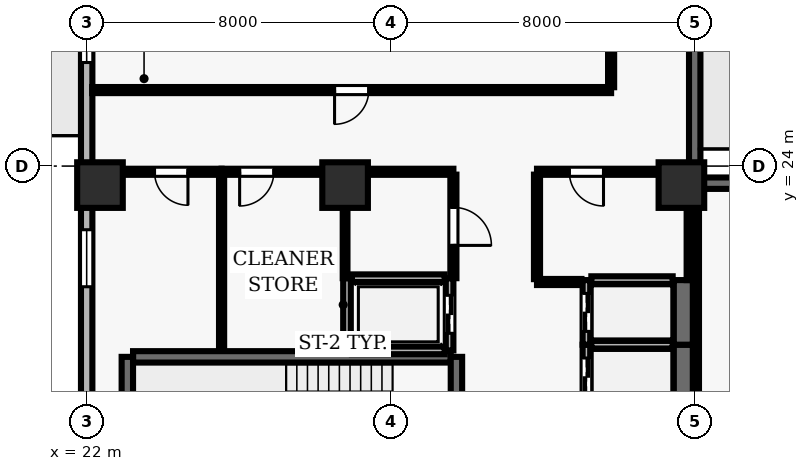
"""IFC4 building model, lengths in metres.
Left out: names, types, materials, properties, quantities, classifications, styles, units other than length and angle.
Written with IfcOpenShell. Run it as: python <this file> out.ifc"""

import sys

from ifc_helpers import new_model, si_unit, direction, frame, frame_2d, origin, origin_2d, place, context, subcontext, project, spatial, rectangle, extrude, element, fill, save


model = new_model("IFC4")
c1 = context("Model", 3, precision=1e-05, world=origin(), true_north=direction((0.0, 1.0)))
c2 = subcontext(c1, "Body", "Model", "MODEL_VIEW")
j1 = project(units=[si_unit("LENGTHUNIT", "METRE"), si_unit("PLANEANGLEUNIT", "RADIAN")], contexts=[c1])
p1 = place(None, origin())
s1 = spatial("IfcSite", under=j1, at=p1, CompositionType="ELEMENT")
p2 = place(p1, origin())
s2 = spatial("IfcBuilding", under=s1, at=p2, CompositionType="ELEMENT")
p3 = place(p2, frame((0.0, 0.0, 154.1)))
s3 = spatial("IfcBuildingStorey", under=s2, at=p3, CompositionType="ELEMENT", Elevation=154.1)
for number, where, z_axis, x_axis in (
    (1, (22.35, 23.5, 0.0), (0.0, 0.0, 1.0), (1.0, 0.0, 0.0)),
    (2, (28.8, 23.5, 0.0), (0.0, 0.0, 1.0), (1.0, 0.0, 0.0)),
    (3, (37.65, 23.5, 0.0), (0.0, 0.0, 1.0), (1.0, 0.0, 0.0)),
):
    element("IfcColumn", number, at=place(p3, frame(where, z_axis=z_axis, x_axis=x_axis)), inside=s3, PredefinedType="COLUMN", context=c2, shape_type="SweptSolid", body=[
        extrude(rectangle(XDim=1.2, YDim=1.2, at=origin_2d()), origin(), (0.0, 0.0, 1.0), 3.9),
    ])
p4 = place(p3, frame((44.194, 23.55, 0.0), z_axis=(0.0, 0.0, 1.0), x_axis=(-1.0, 0.0, 0.0)))
e4 = element("IfcWall", 4, at=p4, inside=s3, PredefinedType="SOLIDWALL", context=c2, shape_type="SweptSolid", body=[
    extrude(rectangle(XDim=6.194, YDim=0.3, at=frame_2d((3.097, 0.0))), origin(), (0.0, 0.0, 1.0), 3.69),
])
p5 = place(p4, frame((1.697, 0.0, 0.9)))
e5 = element("IfcOpeningElement", 5, at=p5, cuts=e4, PredefinedType="OPENING", context=c2, shape_type="SweptSolid", body=[
    extrude(rectangle(XDim=2.8, YDim=1.8, at=frame_2d((1.4, 0.9))), frame((0.0, 0.16, 0.0), z_axis=(0.0, -1.0, 0.0), x_axis=(1.0, 0.0, 0.0)), (0.0, 0.0, 1.0), 0.32),
])
p6 = place(p3, frame((38.0, 23.55, 0.0), z_axis=(0.0, 0.0, 1.0), x_axis=(0.0, 1.0, 0.0)))
e6 = element("IfcWall", 6, at=p6, inside=s3, PredefinedType="SOLIDWALL", context=c2, shape_type="SweptSolid", body=[
    extrude(rectangle(XDim=22.55, YDim=0.3, at=frame_2d((11.275, 0.0))), origin(), (0.0, 0.0, 1.0), 3.69),
])
p7 = place(p6, frame((8.675, 0.0, 0.0)))
e7 = element("IfcOpeningElement", 7, at=p7, cuts=e6, PredefinedType="OPENING", context=c2, shape_type="SweptSolid", body=[
    extrude(rectangle(XDim=1.0, YDim=2.2, at=frame_2d((0.5, 1.1))), frame((0.0, 0.16, 0.0), z_axis=(0.0, -1.0, 0.0), x_axis=(1.0, 0.0, 0.0)), (0.0, 0.0, 1.0), 0.32),
])
p8 = place(p6, frame((13.194, 0.0, 0.9)))
e8 = element("IfcOpeningElement", 8, at=p8, cuts=e6, PredefinedType="OPENING", context=c2, shape_type="SweptSolid", body=[
    extrude(rectangle(XDim=1.8, YDim=2.2, at=frame_2d((0.9, 1.1))), frame((0.0, 0.16, 0.0), z_axis=(0.0, -1.0, 0.0), x_axis=(1.0, 0.0, 0.0)), (0.0, 0.0, 1.0), 0.32),
])
p9 = place(p6, frame((18.831, 0.0, 0.9)))
e9 = element("IfcOpeningElement", 9, at=p9, cuts=e6, PredefinedType="OPENING", context=c2, shape_type="SweptSolid", body=[
    extrude(rectangle(XDim=1.8, YDim=2.2, at=frame_2d((0.9, 1.1))), frame((0.0, 0.16, 0.0), z_axis=(0.0, -1.0, 0.0), x_axis=(1.0, 0.0, 0.0)), (0.0, 0.0, 1.0), 0.32),
])
p10 = place(p3, frame((22.0, 46.1, 0.0), z_axis=(0.0, 0.0, 1.0), x_axis=(0.0, -1.0, 0.0)))
e10 = element("IfcWall", 10, at=p10, inside=s3, PredefinedType="SOLIDWALL", context=c2, shape_type="SweptSolid", body=[
    extrude(rectangle(XDim=43.6, YDim=0.3, at=frame_2d((21.8, 0.0))), origin(), (0.0, 0.0, 1.0), 3.69),
])
p11 = place(p10, frame((6.5, 0.0, 0.0)))
e11 = element("IfcOpeningElement", 11, at=p11, cuts=e10, PredefinedType="OPENING", context=c2, shape_type="SweptSolid", body=[
    extrude(rectangle(XDim=1.0, YDim=2.2, at=frame_2d((0.5, 1.1))), frame((0.0, 0.16, 0.0), z_axis=(0.0, -1.0, 0.0), x_axis=(1.0, 0.0, 0.0)), (0.0, 0.0, 1.0), 0.32),
])
p12 = place(p10, frame((11.975, 0.0, 0.9)))
e12 = element("IfcOpeningElement", 12, at=p12, cuts=e10, PredefinedType="OPENING", context=c2, shape_type="SweptSolid", body=[
    extrude(rectangle(XDim=1.5, YDim=1.6, at=frame_2d((0.75, 0.8))), frame((0.0, 0.16, 0.0), z_axis=(0.0, -1.0, 0.0), x_axis=(1.0, 0.0, 0.0)), (0.0, 0.0, 1.0), 0.32),
])
p13 = place(p10, frame((17.875, 0.0, 0.9)))
e13 = element("IfcOpeningElement", 13, at=p13, cuts=e10, PredefinedType="OPENING", context=c2, shape_type="SweptSolid", body=[
    extrude(rectangle(XDim=1.5, YDim=1.6, at=frame_2d((0.75, 0.8))), frame((0.0, 0.16, 0.0), z_axis=(0.0, -1.0, 0.0), x_axis=(1.0, 0.0, 0.0)), (0.0, 0.0, 1.0), 0.32),
])
p14 = place(p10, frame((23.775, 0.0, 0.9)))
e14 = element("IfcOpeningElement", 14, at=p14, cuts=e10, PredefinedType="OPENING", context=c2, shape_type="SweptSolid", body=[
    extrude(rectangle(XDim=1.5, YDim=1.6, at=frame_2d((0.75, 0.8))), frame((0.0, 0.16, 0.0), z_axis=(0.0, -1.0, 0.0), x_axis=(1.0, 0.0, 0.0)), (0.0, 0.0, 1.0), 0.32),
])
p15 = place(p10, frame((28.775, 0.0, 0.9)))
e15 = element("IfcOpeningElement", 15, at=p15, cuts=e10, PredefinedType="OPENING", context=c2, shape_type="SweptSolid", body=[
    extrude(rectangle(XDim=1.5, YDim=1.6, at=frame_2d((0.75, 0.8))), frame((0.0, 0.16, 0.0), z_axis=(0.0, -1.0, 0.0), x_axis=(1.0, 0.0, 0.0)), (0.0, 0.0, 1.0), 0.32),
])
p16 = place(p10, frame((34.675, 0.0, 0.9)))
e16 = element("IfcOpeningElement", 16, at=p16, cuts=e10, PredefinedType="OPENING", context=c2, shape_type="SweptSolid", body=[
    extrude(rectangle(XDim=1.5, YDim=1.6, at=frame_2d((0.75, 0.8))), frame((0.0, 0.16, 0.0), z_axis=(0.0, -1.0, 0.0), x_axis=(1.0, 0.0, 0.0)), (0.0, 0.0, 1.0), 0.32),
])
p17 = place(p3, frame((31.58, 18.98, 0.0), z_axis=(0.0, 0.0, 1.0), x_axis=(-1.0, 0.0, 0.0)))
e17 = element("IfcWall", 17, at=p17, inside=s3, PredefinedType="SHEAR", context=c2, shape_type="SweptSolid", body=[
    extrude(rectangle(XDim=8.36, YDim=0.3, at=frame_2d((4.18, 0.0))), origin(), (0.0, 0.0, 1.0), 3.69),
])
p18 = place(p3, frame((23.07, 18.98, 0.0), z_axis=(0.0, 0.0, 1.0), x_axis=(0.0, -1.0, 0.0)))
e18 = element("IfcWall", 18, at=p18, inside=s3, PredefinedType="SHEAR", context=c2, shape_type="SweptSolid", body=[
    extrude(rectangle(XDim=3.51, YDim=0.3, at=frame_2d((1.755, 0.0))), origin(), (0.0, 0.0, 1.0), 3.69),
])
p19 = place(p3, frame((31.73, 15.47, 0.0), z_axis=(0.0, 0.0, 1.0), x_axis=(0.0, 1.0, 0.0)))
e19 = element("IfcWall", 19, at=p19, inside=s3, PredefinedType="SHEAR", context=c2, shape_type="SweptSolid", body=[
    extrude(rectangle(XDim=3.51, YDim=0.3, at=frame_2d((1.755, 0.0))), origin(), (0.0, 0.0, 1.0), 3.69),
])
p20 = place(p19, frame((1.18, 0.0, 0.0)))
e20 = element("IfcOpeningElement", 20, at=p20, cuts=e19, PredefinedType="OPENING", context=c2, shape_type="SweptSolid", body=[
    extrude(rectangle(XDim=1.15, YDim=2.15, at=frame_2d((0.575, 1.075))), frame((0.0, 0.16, 0.0), z_axis=(0.0, -1.0, 0.0), x_axis=(1.0, 0.0, 0.0)), (0.0, 0.0, 1.0), 0.32),
])
p21 = place(p3, frame((35.15, 19.3, 0.0), z_axis=(0.0, 0.0, 1.0), x_axis=(0.0, -1.0, 0.0)))
e21 = element("IfcWall", 21, at=p21, inside=s3, PredefinedType="SOLIDWALL", context=c2, shape_type="SweptSolid", body=[
    extrude(rectangle(XDim=1.7, YDim=0.2, at=frame_2d((0.85, 0.0))), origin(), (0.0, 0.0, 1.0), 3.69),
])
p22 = place(p21, frame((0.35, 0.0, 0.0)))
e22 = element("IfcOpeningElement", 22, at=p22, cuts=e21, PredefinedType="OPENING", context=c2, shape_type="SweptSolid", body=[
    extrude(rectangle(XDim=1.0, YDim=2.1, at=frame_2d((0.5, 1.05))), frame((0.0, 0.11, 0.0), z_axis=(0.0, -1.0, 0.0), x_axis=(1.0, 0.0, 0.0)), (0.0, 0.0, 1.0), 0.22),
])
p23 = place(p3, frame((37.7, 17.6, 0.0), z_axis=(0.0, 0.0, 1.0), x_axis=(0.0, 1.0, 0.0)))
e23 = element("IfcWall", 23, at=p23, inside=s3, PredefinedType="SHEAR", context=c2, shape_type="SweptSolid", body=[
    extrude(rectangle(XDim=1.7, YDim=0.5, at=frame_2d((0.85, 0.0))), origin(), (0.0, 0.0, 1.0), 3.69),
])
p24 = place(p3, frame((37.42, 19.3, 0.0), z_axis=(0.0, 0.0, 1.0), x_axis=(-1.0, 0.0, 0.0)))
e24 = element("IfcWall", 24, at=p24, inside=s3, PredefinedType="SOLIDWALL", context=c2, shape_type="SweptSolid", body=[
    extrude(rectangle(XDim=2.14, YDim=0.2, at=frame_2d((1.07, 0.0))), origin(), (0.0, 0.0, 1.0), 3.69),
])
p25 = place(p3, frame((35.15, 21.0, 0.0), z_axis=(0.0, 0.0, 1.0), x_axis=(0.0, -1.0, 0.0)))
e25 = element("IfcWall", 25, at=p25, inside=s3, PredefinedType="SOLIDWALL", context=c2, shape_type="SweptSolid", body=[
    extrude(rectangle(XDim=1.7, YDim=0.2, at=frame_2d((0.85, 0.0))), origin(), (0.0, 0.0, 1.0), 3.69),
])
p26 = place(p25, frame((0.35, 0.0, 0.0)))
e26 = element("IfcOpeningElement", 26, at=p26, cuts=e25, PredefinedType="OPENING", context=c2, shape_type="SweptSolid", body=[
    extrude(rectangle(XDim=1.0, YDim=2.1, at=frame_2d((0.5, 1.05))), frame((0.0, 0.11, 0.0), z_axis=(0.0, -1.0, 0.0), x_axis=(1.0, 0.0, 0.0)), (0.0, 0.0, 1.0), 0.22),
])
p27 = place(p3, frame((37.7, 19.3, 0.0), z_axis=(0.0, 0.0, 1.0), x_axis=(0.0, 1.0, 0.0)))
e27 = element("IfcWall", 27, at=p27, inside=s3, PredefinedType="SHEAR", context=c2, shape_type="SweptSolid", body=[
    extrude(rectangle(XDim=1.7, YDim=0.5, at=frame_2d((0.85, 0.0))), origin(), (0.0, 0.0, 1.0), 3.69),
])
p28 = place(p3, frame((37.42, 21.0, 0.0), z_axis=(0.0, 0.0, 1.0), x_axis=(-1.0, 0.0, 0.0)))
e28 = element("IfcWall", 28, at=p28, inside=s3, PredefinedType="SOLIDWALL", context=c2, shape_type="SweptSolid", body=[
    extrude(rectangle(XDim=2.14, YDim=0.2, at=frame_2d((1.07, 0.0))), origin(), (0.0, 0.0, 1.0), 3.69),
])
p29 = place(p3, frame((28.85, 21.05, 0.0), z_axis=(0.0, 0.0, 1.0), x_axis=(0.0, -1.0, 0.0)))
e29 = element("IfcWall", 29, at=p29, inside=s3, PredefinedType="SOLIDWALL", context=c2, shape_type="SweptSolid", body=[
    extrude(rectangle(XDim=1.9, YDim=0.2, at=frame_2d((0.95, 0.0))), origin(), (0.0, 0.0, 1.0), 3.69),
])
p30 = place(p3, frame((31.55, 19.15, 0.0), z_axis=(0.0, 0.0, 1.0), x_axis=(0.0, 1.0, 0.0)))
e30 = element("IfcWall", 30, at=p30, inside=s3, PredefinedType="SOLIDWALL", context=c2, shape_type="SweptSolid", body=[
    extrude(rectangle(XDim=1.9, YDim=0.2, at=frame_2d((0.95, 0.0))), origin(), (0.0, 0.0, 1.0), 3.69),
])
p31 = place(p30, frame((0.45, 0.0, 0.0)))
e31 = element("IfcOpeningElement", 31, at=p31, cuts=e30, PredefinedType="OPENING", context=c2, shape_type="SweptSolid", body=[
    extrude(rectangle(XDim=1.0, YDim=2.1, at=frame_2d((0.5, 1.05))), frame((0.0, 0.11, 0.0), z_axis=(0.0, -1.0, 0.0), x_axis=(1.0, 0.0, 0.0)), (0.0, 0.0, 1.0), 0.22),
])
for number, where, z_axis, x_axis in (
    (32, (28.98, 19.15, 0.0), (0.0, 0.0, 1.0), (1.0, 0.0, 0.0)),
    (33, (31.42, 21.05, 0.0), (0.0, 0.0, 1.0), (-1.0, 0.0, 0.0)),
):
    element("IfcWall", number, at=place(p3, frame(where, z_axis=z_axis, x_axis=x_axis)), inside=s3, PredefinedType="SOLIDWALL", context=c2, shape_type="SweptSolid", body=[
        extrude(rectangle(XDim=2.44, YDim=0.2, at=frame_2d((1.22, 0.0))), origin(), (0.0, 0.0, 1.0), 3.69),
    ])
p32 = place(p3, frame((25.55, 23.85, 0.0), z_axis=(0.0, 0.0, 1.0), x_axis=(-1.0, 0.0, 0.0)))
e34 = element("IfcWall", 34, at=p32, inside=s3, PredefinedType="PARTITIONING", context=c2, shape_type="SweptSolid", body=[
    extrude(rectangle(XDim=3.35, YDim=0.16, at=frame_2d((1.675, 0.0))), origin(), (0.0, 0.0, 1.0), 3.073),
])
p33 = place(p32, frame((0.885, 0.0, 0.0)))
e35 = element("IfcOpeningElement", 35, at=p33, cuts=e34, PredefinedType="OPENING", context=c2, shape_type="SweptSolid", body=[
    extrude(rectangle(XDim=0.88, YDim=2.1, at=frame_2d((0.44, 1.05))), frame((0.0, 0.09, 0.0), z_axis=(0.0, -1.0, 0.0), x_axis=(1.0, 0.0, 0.0)), (0.0, 0.0, 1.0), 0.18),
])
p34 = place(p3, frame((28.8, 23.85, 0.0), z_axis=(0.0, 0.0, 1.0), x_axis=(-1.0, 0.0, 0.0)))
e36 = element("IfcWall", 36, at=p34, inside=s3, PredefinedType="PARTITIONING", context=c2, shape_type="SweptSolid", body=[
    extrude(rectangle(XDim=3.25, YDim=0.16, at=frame_2d((1.625, 0.0))), origin(), (0.0, 0.0, 1.0), 3.073),
])
p35 = place(p34, frame((1.875, 0.0, 0.0)))
e37 = element("IfcOpeningElement", 37, at=p35, cuts=e36, PredefinedType="OPENING", context=c2, shape_type="SweptSolid", body=[
    extrude(rectangle(XDim=0.9, YDim=2.1, at=frame_2d((0.45, 1.05))), frame((0.0, 0.09, 0.0), z_axis=(0.0, -1.0, 0.0), x_axis=(1.0, 0.0, 0.0)), (0.0, 0.0, 1.0), 0.18),
])
p36 = place(p3, frame((31.65, 23.85, 0.0), z_axis=(0.0, 0.0, 1.0), x_axis=(-1.0, 0.0, 0.0)))
e38 = element("IfcWall", 38, at=p36, inside=s3, PredefinedType="PARTITIONING", context=c2, shape_type="SweptSolid", body=[
    extrude(rectangle(XDim=2.85, YDim=0.16, at=frame_2d((1.425, 0.0))), origin(), (0.0, 0.0, 1.0), 3.073),
])
p37 = place(p3, frame((35.02, 20.95, 0.0), z_axis=(0.0, 0.0, 1.0), x_axis=(-1.0, 0.0, 0.0)))
e39 = element("IfcWall", 39, at=p37, inside=s3, PredefinedType="PARTITIONING", context=c2, shape_type="SweptSolid", body=[
    extrude(rectangle(XDim=1.17, YDim=0.16, at=frame_2d((0.585, 0.0))), origin(), (0.0, 0.0, 1.0), 3.69),
])
p38 = place(p3, frame((35.8, 26.0, 0.0), z_axis=(0.0, 0.0, 1.0), x_axis=(-1.0, 0.0, 0.0)))
e40 = element("IfcWall", 40, at=p38, inside=s3, PredefinedType="PARTITIONING", context=c2, shape_type="SweptSolid", body=[
    extrude(rectangle(XDim=13.655, YDim=0.16, at=frame_2d((6.828, 0.0))), origin(), (0.0, 0.0, 1.0), 3.69),
])
p39 = place(p38, frame((6.377, 0.0, 0.0)))
e41 = element("IfcOpeningElement", 41, at=p39, cuts=e40, PredefinedType="OPENING", context=c2, shape_type="SweptSolid", body=[
    extrude(rectangle(XDim=0.9, YDim=2.1, at=frame_2d((0.45, 1.05))), frame((0.0, 0.09, 0.0), z_axis=(0.0, -1.0, 0.0), x_axis=(1.0, 0.0, 0.0)), (0.0, 0.0, 1.0), 0.18),
])
p40 = place(p3, frame((37.85, 23.85, 0.0), z_axis=(0.0, 0.0, 1.0), x_axis=(-1.0, 0.0, 0.0)))
e42 = element("IfcWall", 42, at=p40, inside=s3, PredefinedType="PARTITIONING", context=c2, shape_type="SweptSolid", body=[
    extrude(rectangle(XDim=4.0, YDim=0.16, at=frame_2d((2.0, 0.0))), origin(), (0.0, 0.0, 1.0), 3.073),
])
p41 = place(p40, frame((2.25, 0.0, 0.0)))
e43 = element("IfcOpeningElement", 43, at=p41, cuts=e42, PredefinedType="OPENING", context=c2, shape_type="SweptSolid", body=[
    extrude(rectangle(XDim=0.9, YDim=2.1, at=frame_2d((0.45, 1.05))), frame((0.0, 0.09, 0.0), z_axis=(0.0, -1.0, 0.0), x_axis=(1.0, 0.0, 0.0)), (0.0, 0.0, 1.0), 0.18),
])
p42 = place(p3, frame((25.55, 19.16, 0.0), z_axis=(0.0, 0.0, 1.0), x_axis=(0.0, 1.0, 0.0)))
e44 = element("IfcWall", 44, at=p42, inside=s3, PredefinedType="PARTITIONING", context=c2, shape_type="SweptSolid", body=[
    extrude(rectangle(XDim=4.615, YDim=0.135, at=frame_2d((2.308, 0.0))), origin(), (0.0, 0.0, 1.0), 3.69),
])
p43 = place(p3, frame((28.8, 23.775, 0.0), z_axis=(0.0, 0.0, 1.0), x_axis=(0.0, -1.0, 0.0)))
e45 = element("IfcWall", 45, at=p43, inside=s3, PredefinedType="PARTITIONING", context=c2, shape_type="SweptSolid", body=[
    extrude(rectangle(XDim=2.725, YDim=0.125, at=frame_2d((1.362, 0.0))), origin(), (0.0, 0.0, 1.0), 3.69),
])
p44 = place(p3, frame((31.65, 23.775, 0.0), z_axis=(0.0, 0.0, 1.0), x_axis=(0.0, -1.0, 0.0)))
e46 = element("IfcWall", 46, at=p44, inside=s3, PredefinedType="PARTITIONING", context=c2, shape_type="SweptSolid", body=[
    extrude(rectangle(XDim=2.725, YDim=0.16, at=frame_2d((1.362, 0.0))), origin(), (0.0, 0.0, 1.0), 3.69),
])
p45 = place(p44, frame((0.862, 0.0, 0.0)))
e47 = element("IfcOpeningElement", 47, at=p45, cuts=e46, PredefinedType="OPENING", context=c2, shape_type="SweptSolid", body=[
    extrude(rectangle(XDim=1.0, YDim=2.1, at=frame_2d((0.5, 1.05))), frame((0.0, 0.09, 0.0), z_axis=(0.0, -1.0, 0.0), x_axis=(1.0, 0.0, 0.0)), (0.0, 0.0, 1.0), 0.18),
])
p46 = place(p3, frame((33.85, 21.025, 0.0), z_axis=(0.0, 0.0, 1.0), x_axis=(0.0, 1.0, 0.0)))
e48 = element("IfcWall", 48, at=p46, inside=s3, PredefinedType="PARTITIONING", context=c2, shape_type="SweptSolid", body=[
    extrude(rectangle(XDim=2.75, YDim=0.16, at=frame_2d((1.375, 0.0))), origin(), (0.0, 0.0, 1.0), 3.69),
])
p47 = place(p3, frame((35.8, 31.822, 0.0), z_axis=(0.0, 0.0, 1.0), x_axis=(0.0, -1.0, 0.0)))
e49 = element("IfcWall", 49, at=p47, inside=s3, PredefinedType="PARTITIONING", context=c2, shape_type="SweptSolid", body=[
    extrude(rectangle(XDim=5.747, YDim=0.16, at=frame_2d((2.874, 0.0))), origin(), (0.0, 0.0, 1.0), 3.69),
])
p48 = place(p3, frame((37.85, 21.0, 0.0), z_axis=(0.0, 0.0, 1.0), x_axis=(0.0, 1.0, 0.0)))
e50 = element("IfcWall", 50, at=p48, inside=s3, PredefinedType="PARTITIONING", context=c2, shape_type="SweptSolid", body=[
    extrude(rectangle(XDim=2.55, YDim=0.125, at=frame_2d((1.275, 0.0))), origin(), (0.0, 0.0, 1.0), 3.073),
])
p49 = place(p3, frame((38.05, 23.405, 0.0), z_axis=(0.0, 0.0, 1.0), x_axis=(0.0, -1.0, 0.0)))
e51 = element("IfcWall", 51, at=p49, inside=s3, PredefinedType="PARTITIONING", context=c2, shape_type="SweptSolid", body=[
    extrude(rectangle(XDim=7.33, YDim=0.125, at=frame_2d((3.665, 0.0))), origin(), (0.0, 0.0, 1.0), 3.073),
])
p50 = place(p13, origin())
e52 = element("IfcWindow", 52, at=p50, inside=s3, PartitioningType="SINGLE_PANEL", PredefinedType="WINDOW", context=c2, shape_type="SweptSolid", body=[
    extrude(rectangle(XDim=1.5, YDim=1.6, at=frame_2d((0.75, 0.8))), frame((0.0, 0.03, 0.0), z_axis=(0.0, -1.0, 0.0), x_axis=(1.0, 0.0, 0.0)), (0.0, 0.0, 1.0), 0.06),
])
fill(e13, e52)
p51 = place(p14, origin())
e53 = element("IfcWindow", 53, at=p51, inside=s3, PartitioningType="SINGLE_PANEL", PredefinedType="WINDOW", context=c2, shape_type="SweptSolid", body=[
    extrude(rectangle(XDim=1.5, YDim=1.6, at=frame_2d((0.75, 0.8))), frame((0.0, 0.03, 0.0), z_axis=(0.0, -1.0, 0.0), x_axis=(1.0, 0.0, 0.0)), (0.0, 0.0, 1.0), 0.06),
])
fill(e14, e53)
p52 = place(p22, origin())
e54 = element("IfcDoor", 54, at=p52, inside=s3, OperationType="DOUBLE_DOOR_SLIDING", PredefinedType="DOOR", context=c2, shape_type="SweptSolid", body=[
    extrude(rectangle(XDim=1.0, YDim=2.1, at=frame_2d((0.5, 1.05))), frame((0.0, 0.025, 0.0), z_axis=(0.0, -1.0, 0.0), x_axis=(1.0, 0.0, 0.0)), (0.0, 0.0, 1.0), 0.05),
])
fill(e22, e54)
p53 = place(p26, origin())
e55 = element("IfcDoor", 55, at=p53, inside=s3, OperationType="DOUBLE_DOOR_SLIDING", PredefinedType="DOOR", context=c2, shape_type="SweptSolid", body=[
    extrude(rectangle(XDim=1.0, YDim=2.1, at=frame_2d((0.5, 1.05))), frame((0.0, 0.025, 0.0), z_axis=(0.0, -1.0, 0.0), x_axis=(1.0, 0.0, 0.0)), (0.0, 0.0, 1.0), 0.05),
])
fill(e26, e55)
p54 = place(p31, origin())
e56 = element("IfcDoor", 56, at=p54, inside=s3, OperationType="DOUBLE_DOOR_SLIDING", PredefinedType="DOOR", context=c2, shape_type="SweptSolid", body=[
    extrude(rectangle(XDim=1.0, YDim=2.1, at=frame_2d((0.5, 1.05))), frame((0.0, 0.025, 0.0), z_axis=(0.0, -1.0, 0.0), x_axis=(1.0, 0.0, 0.0)), (0.0, 0.0, 1.0), 0.05),
])
fill(e31, e56)
p55 = place(p41, origin())
e57 = element("IfcDoor", 57, at=p55, inside=s3, OperationType="SINGLE_SWING_LEFT", PredefinedType="DOOR", context=c2, shape_type="SweptSolid", body=[
    extrude(rectangle(XDim=0.9, YDim=2.1, at=frame_2d((0.45, 1.05))), frame((0.0, 0.025, 0.0), z_axis=(0.0, -1.0, 0.0), x_axis=(1.0, 0.0, 0.0)), (0.0, 0.0, 1.0), 0.05),
])
fill(e43, e57)
p56 = place(p45, origin())
e58 = element("IfcDoor", 58, at=p56, inside=s3, OperationType="SINGLE_SWING_RIGHT", PredefinedType="DOOR", context=c2, shape_type="SweptSolid", body=[
    extrude(rectangle(XDim=1.0, YDim=2.1, at=frame_2d((0.5, 1.05))), frame((0.0, 0.025, 0.0), z_axis=(0.0, -1.0, 0.0), x_axis=(1.0, 0.0, 0.0)), (0.0, 0.0, 1.0), 0.05),
])
fill(e47, e58)
p57 = place(p33, origin())
e59 = element("IfcDoor", 59, at=p57, inside=s3, OperationType="SINGLE_SWING_LEFT", PredefinedType="DOOR", context=c2, shape_type="SweptSolid", body=[
    extrude(rectangle(XDim=0.88, YDim=2.1, at=frame_2d((0.44, 1.05))), frame((0.0, 0.025, 0.0), z_axis=(0.0, -1.0, 0.0), x_axis=(1.0, 0.0, 0.0)), (0.0, 0.0, 1.0), 0.05),
])
fill(e35, e59)
p58 = place(p35, origin())
e60 = element("IfcDoor", 60, at=p58, inside=s3, OperationType="SINGLE_SWING_RIGHT", PredefinedType="DOOR", context=c2, shape_type="SweptSolid", body=[
    extrude(rectangle(XDim=0.9, YDim=2.1, at=frame_2d((0.45, 1.05))), frame((0.0, 0.025, 0.0), z_axis=(0.0, -1.0, 0.0), x_axis=(1.0, 0.0, 0.0)), (0.0, 0.0, 1.0), 0.05),
])
fill(e37, e60)
p59 = place(p39, origin())
e61 = element("IfcDoor", 61, at=p59, inside=s3, OperationType="SINGLE_SWING_RIGHT", PredefinedType="DOOR", context=c2, shape_type="SweptSolid", body=[
    extrude(rectangle(XDim=0.9, YDim=2.1, at=frame_2d((0.45, 1.05))), frame((0.0, 0.025, 0.0), z_axis=(0.0, -1.0, 0.0), x_axis=(1.0, 0.0, 0.0)), (0.0, 0.0, 1.0), 0.05),
])
fill(e41, e61)
save(model, sys.argv[1])
